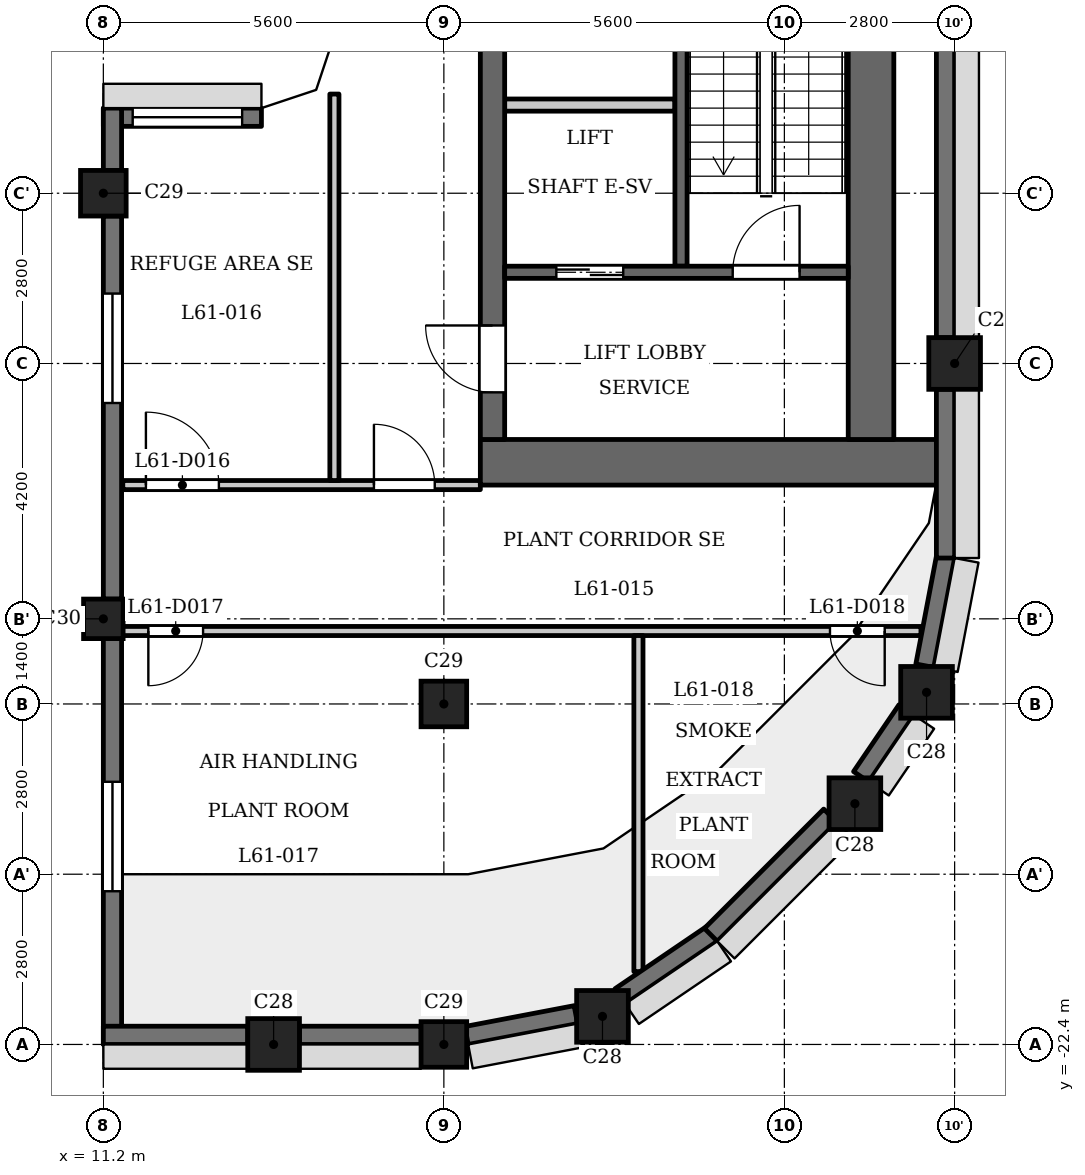
"""IFC4 building model, lengths in metres.
Left out: names, types, materials, properties, quantities, classifications, styles, units other than length and angle.
Written with IfcOpenShell. Run it as: python <this file> out.ifc"""

import sys

from ifc_helpers import new_model, si_unit, direction, frame, frame_2d, origin, origin_2d, place, context, subcontext, project, spatial, polyline, rectangle, outline, extrude, element, fill, save


model = new_model("IFC4")
c1 = context("Model", 3, precision=1e-05, world=origin(), true_north=direction((0.0, 1.0)))
c2 = subcontext(c1, "Body", "Model", "MODEL_VIEW")
j1 = project(units=[si_unit("LENGTHUNIT", "METRE"), si_unit("PLANEANGLEUNIT", "RADIAN")], contexts=[c1])
p1 = place(None, origin())
s1 = spatial("IfcSite", under=j1, at=p1, CompositionType="ELEMENT")
p2 = place(p1, origin())
s2 = spatial("IfcBuilding", under=s1, at=p2, CompositionType="ELEMENT")
p3 = place(p2, frame((0.0, 0.0, 236.3)))
s3 = spatial("IfcBuildingStorey", under=s2, at=p3, CompositionType="ELEMENT", Elevation=236.3)
for number, where, z_axis, x_axis in (
    (1, (14.0, -22.4, 0.0), (0.0, 0.0, 1.0), (1.0, 0.0, 0.0)),
    (2, (19.409, -21.938, 0.0), (0.0, 0.0, 1.0), (1.0, 0.0, 0.0)),
    (3, (23.56, -18.44, 0.0), (0.0, 0.0, 1.0), (1.0, 0.0, 0.0)),
    (4, (24.738, -16.609, 0.0), (0.0, 0.0, 1.0), (1.0, 0.0, 0.0)),
    (5, (25.2, -11.2, 0.0), (0.0, 0.0, 1.0), (1.0, 0.0, 0.0)),
):
    element("IfcColumn", number, at=place(p3, frame(where, z_axis=z_axis, x_axis=x_axis)), inside=s3, PredefinedType="COLUMN", context=c2, shape_type="SweptSolid", body=[
        extrude(rectangle(XDim=0.85, YDim=0.85, at=origin_2d()), origin(), (0.0, 0.0, 1.0), 5.4),
    ])
for number, where, z_axis, x_axis in (
    (6, (16.8, -22.4, 0.0), (0.0, 0.0, 1.0), (1.0, 0.0, 0.0)),
    (7, (16.8, -16.8, 0.0), (0.0, 0.0, 1.0), (1.0, 0.0, 0.0)),
    (8, (11.2, -8.4, 0.0), (0.0, 0.0, 1.0), (1.0, 0.0, 0.0)),
):
    element("IfcColumn", number, at=place(p3, frame(where, z_axis=z_axis, x_axis=x_axis)), inside=s3, PredefinedType="COLUMN", context=c2, shape_type="SweptSolid", body=[
        extrude(rectangle(XDim=0.75, YDim=0.75, at=origin_2d()), origin(), (0.0, 0.0, 1.0), 5.4),
    ])
p4 = place(p3, frame((11.2, -15.4, 0.0), z_axis=(0.0, 0.0, 1.0), x_axis=(1.0, 0.0, 0.0)))
e9 = element("IfcColumn", 9, at=p4, inside=s3, PredefinedType="COLUMN", context=c2, shape_type="SweptSolid", body=[
    extrude(rectangle(XDim=0.65, YDim=0.65, at=origin_2d()), origin(), (0.0, 0.0, 1.0), 5.4),
])
p5 = place(p3, frame((13.8, -7.15, 0.0), z_axis=(0.0, 0.0, 1.0), x_axis=(-1.0, 0.0, 0.0)))
e10 = element("IfcWall", 10, at=p5, inside=s3, PredefinedType="SOLIDWALL", context=c2, shape_type="SweptSolid", body=[
    extrude(rectangle(XDim=2.6, YDim=0.3, at=frame_2d((1.3, 0.0))), origin(), (0.0, 0.0, 1.0), 4.6),
])
p6 = place(p5, frame((0.317, 0.0, 0.9)))
e11 = element("IfcOpeningElement", 11, at=p6, cuts=e10, PredefinedType="OPENING", context=c2, shape_type="SweptSolid", body=[
    extrude(rectangle(XDim=1.8, YDim=1.5, at=frame_2d((0.9, 0.75))), frame((0.0, 0.16, 0.0), z_axis=(0.0, -1.0, 0.0), x_axis=(1.0, 0.0, 0.0)), (0.0, 0.0, 1.0), 0.32),
])
p7 = place(p3, frame((11.35, -7.0, 0.0), z_axis=(0.0, 0.0, 1.0), x_axis=(0.0, -1.0, 0.0)))
e12 = element("IfcWall", 12, at=p7, inside=s3, PredefinedType="SOLIDWALL", context=c2, shape_type="SweptSolid", body=[
    extrude(rectangle(XDim=1.025, YDim=0.3, at=frame_2d((0.512, 0.0))), origin(), (0.0, 0.0, 1.0), 4.6),
])
p8 = place(p3, frame((11.35, -8.775, 0.0), z_axis=(0.0, 0.0, 1.0), x_axis=(0.0, -1.0, 0.0)))
e13 = element("IfcWall", 13, at=p8, inside=s3, PredefinedType="SOLIDWALL", context=c2, shape_type="SweptSolid", body=[
    extrude(rectangle(XDim=6.3, YDim=0.3, at=frame_2d((3.15, 0.0))), origin(), (0.0, 0.0, 1.0), 4.6),
])
p9 = place(p8, frame((1.275, 0.0, 0.9)))
e14 = element("IfcOpeningElement", 14, at=p9, cuts=e13, PredefinedType="OPENING", context=c2, shape_type="SweptSolid", body=[
    extrude(rectangle(XDim=1.8, YDim=1.5, at=frame_2d((0.9, 0.75))), frame((0.0, 0.16, 0.0), z_axis=(0.0, -1.0, 0.0), x_axis=(1.0, 0.0, 0.0)), (0.0, 0.0, 1.0), 0.32),
])
p10 = place(p3, frame((11.35, -15.725, 0.0), z_axis=(0.0, 0.0, 1.0), x_axis=(0.0, -1.0, 0.0)))
e15 = element("IfcWall", 15, at=p10, inside=s3, PredefinedType="SOLIDWALL", context=c2, shape_type="SweptSolid", body=[
    extrude(rectangle(XDim=6.675, YDim=0.3, at=frame_2d((3.337, 0.0))), origin(), (0.0, 0.0, 1.0), 4.6),
])
p11 = place(p10, frame((2.355, 0.0, 0.9)))
e16 = element("IfcOpeningElement", 16, at=p11, cuts=e15, PredefinedType="OPENING", context=c2, shape_type="SweptSolid", body=[
    extrude(rectangle(XDim=1.8, YDim=1.5, at=frame_2d((0.9, 0.75))), frame((0.0, 0.16, 0.0), z_axis=(0.0, -1.0, 0.0), x_axis=(1.0, 0.0, 0.0)), (0.0, 0.0, 1.0), 0.32),
])
p12 = place(p3, frame((11.2, -22.25, 0.0), z_axis=(0.0, 0.0, 1.0), x_axis=(1.0, 0.0, 0.0)))
e17 = element("IfcWall", 17, at=p12, inside=s3, PredefinedType="SOLIDWALL", context=c2, shape_type="SweptSolid", body=[
    extrude(rectangle(XDim=2.375, YDim=0.3, at=frame_2d((1.188, 0.0))), origin(), (0.0, 0.0, 1.0), 4.6),
])
p13 = place(p3, frame((14.425, -22.25, 0.0), z_axis=(0.0, 0.0, 1.0), x_axis=(1.0, 0.0, 0.0)))
e18 = element("IfcWall", 18, at=p13, inside=s3, PredefinedType="SOLIDWALL", context=c2, shape_type="SweptSolid", body=[
    extrude(rectangle(XDim=2.0, YDim=0.3, at=frame_2d((1.0, 0.0))), origin(), (0.0, 0.0, 1.0), 2.6),
])
p14 = place(p3, frame((17.172, -22.253, 0.0), z_axis=(0.0, 0.0, 1.0), x_axis=(0.982300037503, 0.187314271538, 0.0)))
e19 = element("IfcWall", 19, at=p14, inside=s3, PredefinedType="SOLIDWALL", context=c2, shape_type="SweptSolid", body=[
    extrude(rectangle(XDim=1.831, YDim=0.3, at=frame_2d((0.916, 0.0))), origin(), (0.0, 0.0, 1.0), 2.6),
])
p15 = place(p3, frame((19.698, -21.608, 0.0), z_axis=(0.0, 0.0, 1.0), x_axis=(0.82705295608, 0.562124014644, 0.0)))
e20 = element("IfcWall", 20, at=p15, inside=s3, PredefinedType="SOLIDWALL", context=c2, shape_type="SweptSolid", body=[
    extrude(rectangle(XDim=1.831, YDim=0.3, at=frame_2d((0.916, 0.0))), origin(), (0.0, 0.0, 1.0), 2.6),
])
p16 = place(p3, frame((21.191, -20.597, 0.0), z_axis=(0.0, 0.0, 1.0), x_axis=(0.707150767798, 0.707062791838, 0.0)))
e21 = element("IfcWall", 21, at=p16, inside=s3, PredefinedType="SOLIDWALL", context=c2, shape_type="SweptSolid", body=[
    extrude(rectangle(XDim=2.775, YDim=0.3, at=frame_2d((1.388, 0.0))), origin(), (0.0, 0.0, 1.0), 2.6),
])
p17 = place(p3, frame((23.662, -17.996, 0.0), z_axis=(0.0, 0.0, 1.0), x_axis=(0.562149004813, 0.827035970432, 0.0)))
e22 = element("IfcWall", 22, at=p17, inside=s3, PredefinedType="SOLIDWALL", context=c2, shape_type="SweptSolid", body=[
    extrude(rectangle(XDim=1.327, YDim=0.3, at=frame_2d((0.664, 0.0))), origin(), (0.0, 0.0, 1.0), 2.6),
])
p18 = place(p3, frame((24.709, -16.171, 0.0), z_axis=(0.0, 0.0, 1.0), x_axis=(0.187442908742, 0.982275499014, 0.0)))
e23 = element("IfcWall", 23, at=p18, inside=s3, PredefinedType="SOLIDWALL", context=c2, shape_type="SweptSolid", body=[
    extrude(rectangle(XDim=1.831, YDim=0.3, at=frame_2d((0.916, 0.0))), origin(), (0.0, 0.0, 1.0), 2.6),
])
p19 = place(p3, frame((25.05, -14.4, 0.0), z_axis=(0.0, 0.0, 1.0), x_axis=(0.0, 1.0, 0.0)))
e24 = element("IfcWall", 24, at=p19, inside=s3, PredefinedType="SOLIDWALL", context=c2, shape_type="SweptSolid", body=[
    extrude(rectangle(XDim=2.775, YDim=0.3, at=frame_2d((1.387, 0.0))), origin(), (0.0, 0.0, 1.0), 2.6),
])
p20 = place(p3, frame((25.05, -10.775, 0.0), z_axis=(0.0, 0.0, 1.0), x_axis=(0.0, 1.0, 0.0)))
e25 = element("IfcWall", 25, at=p20, inside=s3, PredefinedType="SOLIDWALL", context=c2, shape_type="SweptSolid", body=[
    extrude(rectangle(XDim=4.75, YDim=0.3, at=frame_2d((2.375, 0.0))), origin(), (0.0, 0.0, 1.0), 2.6),
])
p21 = place(p3, frame((20.7, -9.6, 0.0), z_axis=(0.0, 0.0, 1.0), x_axis=(0.0, 1.0, 0.0)))
e26 = element("IfcWall", 26, at=p21, inside=s3, PredefinedType="SHEAR", context=c2, shape_type="SweptSolid", body=[
    extrude(rectangle(XDim=7.35, YDim=0.2, at=frame_2d((3.675, 0.0))), origin(), (0.0, 0.0, 1.0), 4.6),
])
p22 = place(p3, frame((17.4, -12.825, 0.0), z_axis=(0.0, 0.0, 1.0), x_axis=(1.0, 0.0, 0.0)))
e27 = element("IfcWall", 27, at=p22, inside=s3, PredefinedType="SHEAR", context=c2, shape_type="SweptSolid", body=[
    extrude(rectangle(XDim=7.6, YDim=0.75, at=frame_2d((3.8, 0.0))), origin(), (0.0, 0.0, 1.0), 4.6),
])
p23 = place(p3, frame((17.6, -12.45, 0.0), z_axis=(0.0, 0.0, 1.0), x_axis=(0.0, 1.0, 0.0)))
e28 = element("IfcWall", 28, at=p23, inside=s3, PredefinedType="SHEAR", context=c2, shape_type="SweptSolid", body=[
    extrude(rectangle(XDim=24.9, YDim=0.4, at=frame_2d((12.45, 0.0))), origin(), (0.0, 0.0, 1.0), 4.6),
])
p24 = place(p23, frame((11.05, 0.0, 0.0)))
e29 = element("IfcOpeningElement", 29, at=p24, cuts=e28, PredefinedType="OPENING", context=c2, shape_type="SweptSolid", body=[
    extrude(rectangle(XDim=0.9, YDim=2.1, at=frame_2d((0.45, 1.05))), frame((0.0, 0.21, 0.0), z_axis=(0.0, -1.0, 0.0), x_axis=(1.0, 0.0, 0.0)), (0.0, 0.0, 1.0), 0.42),
])
p25 = place(p23, frame((15.6, 0.0, 0.0)))
e30 = element("IfcOpeningElement", 30, at=p25, cuts=e28, PredefinedType="OPENING", context=c2, shape_type="SweptSolid", body=[
    extrude(rectangle(XDim=1.1, YDim=2.1, at=frame_2d((0.55, 1.05))), frame((0.0, 0.21, 0.0), z_axis=(0.0, -1.0, 0.0), x_axis=(1.0, 0.0, 0.0)), (0.0, 0.0, 1.0), 0.42),
])
p26 = place(p23, frame((18.0, 0.0, 0.0)))
e31 = element("IfcOpeningElement", 31, at=p26, cuts=e28, PredefinedType="OPENING", context=c2, shape_type="SweptSolid", body=[
    extrude(rectangle(XDim=1.1, YDim=2.1, at=frame_2d((0.55, 1.05))), frame((0.0, 0.21, 0.0), z_axis=(0.0, -1.0, 0.0), x_axis=(1.0, 0.0, 0.0)), (0.0, 0.0, 1.0), 0.42),
])
p27 = place(p23, frame((23.025, 0.0, 0.0)))
e32 = element("IfcOpeningElement", 32, at=p27, cuts=e28, PredefinedType="OPENING", context=c2, shape_type="SweptSolid", body=[
    extrude(rectangle(XDim=1.1, YDim=2.1, at=frame_2d((0.55, 1.05))), frame((0.0, 0.21, 0.0), z_axis=(0.0, -1.0, 0.0), x_axis=(1.0, 0.0, 0.0)), (0.0, 0.0, 1.0), 0.42),
])
p28 = place(p23, frame((0.775, 0.0, 0.0)))
e33 = element("IfcOpeningElement", 33, at=p28, cuts=e28, PredefinedType="OPENING", context=c2, shape_type="SweptSolid", body=[
    extrude(rectangle(XDim=1.1, YDim=2.1, at=frame_2d((0.55, 1.05))), frame((0.0, 0.21, 0.0), z_axis=(0.0, -1.0, 0.0), x_axis=(1.0, 0.0, 0.0)), (0.0, 0.0, 1.0), 0.42),
])
p29 = place(p23, frame((12.925, 0.0, 0.0)))
e34 = element("IfcOpeningElement", 34, at=p29, cuts=e28, PredefinedType="OPENING", context=c2, shape_type="SweptSolid", body=[
    extrude(rectangle(XDim=1.8, YDim=2.1, at=frame_2d((0.9, 1.05))), frame((0.0, 0.21, 0.0), z_axis=(0.0, -1.0, 0.0), x_axis=(1.0, 0.0, 0.0)), (0.0, 0.0, 1.0), 0.42),
])
p30 = place(p3, frame((23.825, -12.45, 0.0), z_axis=(0.0, 0.0, 1.0), x_axis=(0.0, 1.0, 0.0)))
e35 = element("IfcWall", 35, at=p30, inside=s3, PredefinedType="SHEAR", context=c2, shape_type="SweptSolid", body=[
    extrude(rectangle(XDim=24.9, YDim=0.75, at=frame_2d((12.45, 0.0))), origin(), (0.0, 0.0, 1.0), 4.6),
])
p31 = place(p3, frame((17.8, -9.7, 0.0), z_axis=(0.0, 0.0, 1.0), x_axis=(1.0, 0.0, 0.0)))
e36 = element("IfcWall", 36, at=p31, inside=s3, PredefinedType="SHEAR", context=c2, shape_type="SweptSolid", body=[
    extrude(rectangle(XDim=5.65, YDim=0.2, at=frame_2d((2.825, 0.0))), origin(), (0.0, 0.0, 1.0), 4.6),
])
p32 = place(p31, frame((0.85, 0.0, 0.0)))
e37 = element("IfcOpeningElement", 37, at=p32, cuts=e36, PredefinedType="OPENING", context=c2, shape_type="SweptSolid", body=[
    extrude(rectangle(XDim=1.1, YDim=2.1, at=frame_2d((0.55, 1.05))), frame((0.0, 0.11, 0.0), z_axis=(0.0, -1.0, 0.0), x_axis=(1.0, 0.0, 0.0)), (0.0, 0.0, 1.0), 0.22),
])
p33 = place(p31, frame((3.75, 0.0, 0.0)))
e38 = element("IfcOpeningElement", 38, at=p33, cuts=e36, PredefinedType="OPENING", context=c2, shape_type="SweptSolid", body=[
    extrude(rectangle(XDim=1.1, YDim=2.1, at=frame_2d((0.55, 1.05))), frame((0.0, 0.11, 0.0), z_axis=(0.0, -1.0, 0.0), x_axis=(1.0, 0.0, 0.0)), (0.0, 0.0, 1.0), 0.22),
])
p34 = place(p3, frame((17.8, -6.95, 0.0), z_axis=(0.0, 0.0, 1.0), x_axis=(1.0, 0.0, 0.0)))
e39 = element("IfcWall", 39, at=p34, inside=s3, PredefinedType="PARTITIONING", context=c2, shape_type="SweptSolid", body=[
    extrude(rectangle(XDim=2.8, YDim=0.2, at=frame_2d((1.4, 0.0))), origin(), (0.0, 0.0, 1.0), 4.6),
])
p35 = place(p3, frame((11.29, -15.6, 0.0), z_axis=(0.0, 0.0, 1.0), x_axis=(1.0, 0.0, 0.0)))
e40 = element("IfcWall", 40, at=p35, inside=s3, PredefinedType="PARTITIONING", context=c2, shape_type="SweptSolid", body=[
    extrude(rectangle(XDim=13.356, YDim=0.15, at=frame_2d((6.678, 0.0))), origin(), (0.0, 0.0, 1.0), 4.6),
])
p36 = place(p35, frame((0.65, 0.0, 0.0)))
e41 = element("IfcOpeningElement", 41, at=p36, cuts=e40, PredefinedType="OPENING", context=c2, shape_type="SweptSolid", body=[
    extrude(rectangle(XDim=0.9, YDim=2.1, at=frame_2d((0.45, 1.05))), frame((0.0, 0.085, 0.0), z_axis=(0.0, -1.0, 0.0), x_axis=(1.0, 0.0, 0.0)), (0.0, 0.0, 1.0), 0.17),
])
p37 = place(p35, frame((11.86, 0.0, 0.0)))
e42 = element("IfcOpeningElement", 42, at=p37, cuts=e40, PredefinedType="OPENING", context=c2, shape_type="SweptSolid", body=[
    extrude(rectangle(XDim=0.9, YDim=2.1, at=frame_2d((0.45, 1.05))), frame((0.0, 0.085, 0.0), z_axis=(0.0, -1.0, 0.0), x_axis=(1.0, 0.0, 0.0)), (0.0, 0.0, 1.0), 0.17),
])
p38 = place(p3, frame((11.52, -13.2, 0.0), z_axis=(0.0, 0.0, 1.0), x_axis=(1.0, 0.0, 0.0)))
e43 = element("IfcWall", 43, at=p38, inside=s3, PredefinedType="PARTITIONING", context=c2, shape_type="SweptSolid", body=[
    extrude(rectangle(XDim=5.88, YDim=0.15, at=frame_2d((2.94, 0.0))), origin(), (0.0, 0.0, 1.0), 4.6),
])
p39 = place(p38, frame((4.13, 0.0, 0.0)))
e44 = element("IfcOpeningElement", 44, at=p39, cuts=e43, PredefinedType="OPENING", context=c2, shape_type="SweptSolid", body=[
    extrude(rectangle(XDim=1.0, YDim=2.1, at=frame_2d((0.5, 1.05))), frame((0.0, 0.085, 0.0), z_axis=(0.0, -1.0, 0.0), x_axis=(1.0, 0.0, 0.0)), (0.0, 0.0, 1.0), 0.17),
])
p40 = place(p38, frame((0.38, 0.0, 0.0)))
e45 = element("IfcOpeningElement", 45, at=p40, cuts=e43, PredefinedType="OPENING", context=c2, shape_type="SweptSolid", body=[
    extrude(rectangle(XDim=1.2, YDim=2.1, at=frame_2d((0.6, 1.05))), frame((0.0, 0.085, 0.0), z_axis=(0.0, -1.0, 0.0), x_axis=(1.0, 0.0, 0.0)), (0.0, 0.0, 1.0), 0.17),
])
p41 = place(p3, frame((15.0, -13.125, 0.0), z_axis=(0.0, 0.0, 1.0), x_axis=(0.0, 1.0, 0.0)))
e46 = element("IfcWall", 46, at=p41, inside=s3, PredefinedType="PARTITIONING", context=c2, shape_type="SweptSolid", body=[
    extrude(rectangle(XDim=6.356, YDim=0.15, at=frame_2d((3.178, 0.0))), origin(), (0.0, 0.0, 1.0), 4.6),
])
p42 = place(p3, frame((20.0, -21.202, 0.0), z_axis=(0.0, 0.0, 1.0), x_axis=(0.0, 1.0, 0.0)))
e47 = element("IfcWall", 47, at=p42, inside=s3, PredefinedType="PARTITIONING", context=c2, shape_type="SweptSolid", body=[
    extrude(rectangle(XDim=5.527, YDim=0.15, at=frame_2d((2.763, 0.0))), origin(), (0.0, 0.0, 1.0), 4.6),
])
p43 = place(p3, origin())
e48 = element("IfcWall", 48, at=p43, inside=s3, PredefinedType="SOLIDWALL", context=c2, shape_type="SweptSolid", body=[
    extrude(outline(polyline([(15.0, -5.8), (14.7, -6.7), (13.8, -7.0), (13.8, -7.3), (13.849, -7.3), (14.937, -6.937), (15.3, -5.849), (15.3, -5.8), (15.0, -5.8)])), origin(), (0.0, 0.0, 1.0), 4.6),
])
p44 = place(p32, origin())
e49 = element("IfcDoor", 49, at=p44, inside=s3, OperationType="DOUBLE_DOOR_SLIDING", PredefinedType="DOOR", context=c2, shape_type="SweptSolid", body=[
    extrude(rectangle(XDim=1.1, YDim=2.1, at=frame_2d((0.55, 1.05))), frame((0.0, 0.025, 0.0), z_axis=(0.0, -1.0, 0.0), x_axis=(1.0, 0.0, 0.0)), (0.0, 0.0, 1.0), 0.05),
])
fill(e37, e49)
p45 = place(p28, origin())
e50 = element("IfcDoor", 50, at=p45, inside=s3, OperationType="SINGLE_SWING_LEFT", PredefinedType="DOOR", context=c2, shape_type="SweptSolid", body=[
    extrude(rectangle(XDim=1.1, YDim=2.1, at=frame_2d((0.55, 1.05))), frame((0.0, 0.025, 0.0), z_axis=(0.0, -1.0, 0.0), x_axis=(1.0, 0.0, 0.0)), (0.0, 0.0, 1.0), 0.05),
])
fill(e33, e50)
p46 = place(p33, origin())
e51 = element("IfcDoor", 51, at=p46, inside=s3, OperationType="SINGLE_SWING_LEFT", PredefinedType="DOOR", context=c2, shape_type="SweptSolid", body=[
    extrude(rectangle(XDim=1.1, YDim=2.1, at=frame_2d((0.55, 1.05))), frame((0.0, 0.025, 0.0), z_axis=(0.0, -1.0, 0.0), x_axis=(1.0, 0.0, 0.0)), (0.0, 0.0, 1.0), 0.05),
])
fill(e38, e51)
p47 = place(p39, origin())
e52 = element("IfcDoor", 52, at=p47, inside=s3, OperationType="SINGLE_SWING_RIGHT", PredefinedType="DOOR", context=c2, shape_type="SweptSolid", body=[
    extrude(rectangle(XDim=1.0, YDim=2.1, at=frame_2d((0.5, 1.05))), frame((0.0, 0.025, 0.0), z_axis=(0.0, -1.0, 0.0), x_axis=(1.0, 0.0, 0.0)), (0.0, 0.0, 1.0), 0.05),
])
fill(e44, e52)
p48 = place(p40, origin())
e53 = element("IfcDoor", 53, at=p48, inside=s3, OperationType="SINGLE_SWING_RIGHT", PredefinedType="DOOR", context=c2, shape_type="SweptSolid", body=[
    extrude(rectangle(XDim=1.2, YDim=2.1, at=frame_2d((0.6, 1.05))), frame((0.0, 0.025, 0.0), z_axis=(0.0, -1.0, 0.0), x_axis=(1.0, 0.0, 0.0)), (0.0, 0.0, 1.0), 0.05),
])
fill(e45, e53)
p49 = place(p36, origin())
e54 = element("IfcDoor", 54, at=p49, inside=s3, OperationType="SINGLE_SWING_LEFT", PredefinedType="DOOR", context=c2, shape_type="SweptSolid", body=[
    extrude(rectangle(XDim=0.9, YDim=2.1, at=frame_2d((0.45, 1.05))), frame((0.0, 0.025, 0.0), z_axis=(0.0, -1.0, 0.0), x_axis=(1.0, 0.0, 0.0)), (0.0, 0.0, 1.0), 0.05),
])
fill(e41, e54)
p50 = place(p37, origin())
e55 = element("IfcDoor", 55, at=p50, inside=s3, OperationType="SINGLE_SWING_RIGHT", PredefinedType="DOOR", context=c2, shape_type="SweptSolid", body=[
    extrude(rectangle(XDim=0.9, YDim=2.1, at=frame_2d((0.45, 1.05))), frame((0.0, 0.025, 0.0), z_axis=(0.0, -1.0, 0.0), x_axis=(1.0, 0.0, 0.0)), (0.0, 0.0, 1.0), 0.05),
])
fill(e42, e55)
p51 = place(p6, origin())
e56 = element("IfcWindow", 56, at=p51, inside=s3, PartitioningType="SINGLE_PANEL", PredefinedType="WINDOW", context=c2, shape_type="SweptSolid", body=[
    extrude(rectangle(XDim=1.8, YDim=1.5, at=frame_2d((0.9, 0.75))), frame((0.0, 0.03, 0.0), z_axis=(0.0, -1.0, 0.0), x_axis=(1.0, 0.0, 0.0)), (0.0, 0.0, 1.0), 0.06),
])
fill(e11, e56)
p52 = place(p9, origin())
e57 = element("IfcWindow", 57, at=p52, inside=s3, PartitioningType="SINGLE_PANEL", PredefinedType="WINDOW", context=c2, shape_type="SweptSolid", body=[
    extrude(rectangle(XDim=1.8, YDim=1.5, at=frame_2d((0.9, 0.75))), frame((0.0, 0.03, 0.0), z_axis=(0.0, -1.0, 0.0), x_axis=(1.0, 0.0, 0.0)), (0.0, 0.0, 1.0), 0.06),
])
fill(e14, e57)
p53 = place(p11, origin())
e58 = element("IfcWindow", 58, at=p53, inside=s3, PartitioningType="SINGLE_PANEL", PredefinedType="WINDOW", context=c2, shape_type="SweptSolid", body=[
    extrude(rectangle(XDim=1.8, YDim=1.5, at=frame_2d((0.9, 0.75))), frame((0.0, 0.03, 0.0), z_axis=(0.0, -1.0, 0.0), x_axis=(1.0, 0.0, 0.0)), (0.0, 0.0, 1.0), 0.06),
])
fill(e16, e58)
save(model, sys.argv[1])
